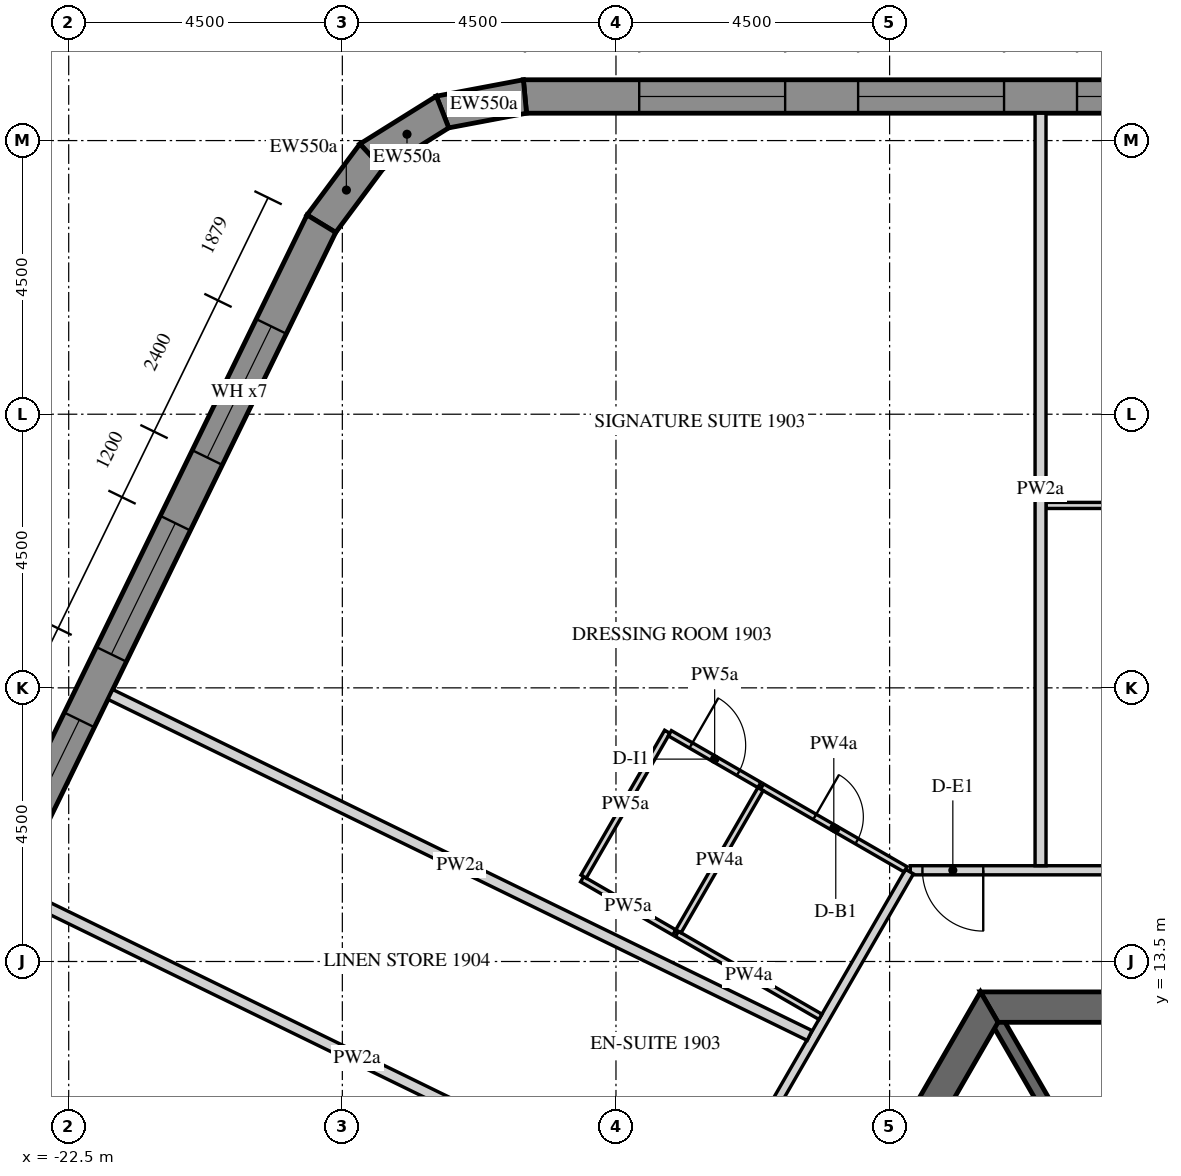
"""IFC4 building model, lengths in metres.
Left out: names, types, materials, properties, quantities, classifications, styles, units other than length and angle.
Written with IfcOpenShell. Run it as: python <this file> out.ifc"""

import sys

from ifc_helpers import new_model, si_unit, direction, frame, frame_2d, origin, place, context, subcontext, project, spatial, polyline, rectangle, outline, extrude, element, fill, save


model = new_model("IFC4")
c1 = context("Model", 3, precision=1e-05, world=origin(), true_north=direction((0.0, 1.0)))
c2 = subcontext(c1, "Body", "Model", "MODEL_VIEW")
j1 = project(units=[si_unit("LENGTHUNIT", "METRE"), si_unit("PLANEANGLEUNIT", "RADIAN")], contexts=[c1])
p1 = place(None, origin())
s1 = spatial("IfcSite", under=j1, at=p1, CompositionType="ELEMENT")
p2 = place(p1, origin())
s2 = spatial("IfcBuilding", under=s1, at=p2, CompositionType="ELEMENT")
p3 = place(p2, frame((0.0, 0.0, 246.3)))
s3 = spatial("IfcBuildingStorey", under=s2, at=p3, CompositionType="ELEMENT", Elevation=246.3)
p4 = place(p3, frame((12.761, 27.725, -0.15), z_axis=(0.0, 0.0, 1.0), x_axis=(-1.0, 0.0, 0.0)))
e1 = element("IfcWall", 1, at=p4, inside=s3, PredefinedType="SOLIDWALL", context=c2, shape_type="SweptSolid", body=[
    extrude(outline(polyline([(-0.022, -0.275), (27.783, -0.275), (27.732, 0.275), (0.022, 0.275), (-0.022, -0.275)])), origin(), (0.0, 0.0, 1.0), 3.75),
])
p5 = place(p4, frame((1.879, 0.0, 1.05)))
e2 = element("IfcOpeningElement", 2, at=p5, cuts=e1, PredefinedType="OPENING", context=c2, shape_type="SweptSolid", body=[
    extrude(rectangle(XDim=2.4, YDim=2.4, at=frame_2d((1.2, 1.2))), frame((0.0, 0.285, 0.0), z_axis=(0.0, -1.0, 0.0), x_axis=(1.0, 0.0, 0.0)), (0.0, 0.0, 1.0), 0.57),
])
p6 = place(p4, frame((5.479, 0.0, 1.05)))
e3 = element("IfcOpeningElement", 3, at=p6, cuts=e1, PredefinedType="OPENING", context=c2, shape_type="SweptSolid", body=[
    extrude(rectangle(XDim=2.4, YDim=2.4, at=frame_2d((1.2, 1.2))), frame((0.0, 0.285, 0.0), z_axis=(0.0, -1.0, 0.0), x_axis=(1.0, 0.0, 0.0)), (0.0, 0.0, 1.0), 0.57),
])
p7 = place(p4, frame((9.079, 0.0, 1.05)))
e4 = element("IfcOpeningElement", 4, at=p7, cuts=e1, PredefinedType="OPENING", context=c2, shape_type="SweptSolid", body=[
    extrude(rectangle(XDim=2.4, YDim=2.4, at=frame_2d((1.2, 1.2))), frame((0.0, 0.285, 0.0), z_axis=(0.0, -1.0, 0.0), x_axis=(1.0, 0.0, 0.0)), (0.0, 0.0, 1.0), 0.57),
])
p8 = place(p4, frame((12.679, 0.0, 1.05)))
e5 = element("IfcOpeningElement", 5, at=p8, cuts=e1, PredefinedType="OPENING", context=c2, shape_type="SweptSolid", body=[
    extrude(rectangle(XDim=2.4, YDim=2.4, at=frame_2d((1.2, 1.2))), frame((0.0, 0.285, 0.0), z_axis=(0.0, -1.0, 0.0), x_axis=(1.0, 0.0, 0.0)), (0.0, 0.0, 1.0), 0.57),
])
p9 = place(p4, frame((16.279, 0.0, 1.05)))
e6 = element("IfcOpeningElement", 6, at=p9, cuts=e1, PredefinedType="OPENING", context=c2, shape_type="SweptSolid", body=[
    extrude(rectangle(XDim=2.4, YDim=2.4, at=frame_2d((1.2, 1.2))), frame((0.0, 0.285, 0.0), z_axis=(0.0, -1.0, 0.0), x_axis=(1.0, 0.0, 0.0)), (0.0, 0.0, 1.0), 0.57),
])
p10 = place(p4, frame((19.879, 0.0, 1.05)))
e7 = element("IfcOpeningElement", 7, at=p10, cuts=e1, PredefinedType="OPENING", context=c2, shape_type="SweptSolid", body=[
    extrude(rectangle(XDim=2.4, YDim=2.4, at=frame_2d((1.2, 1.2))), frame((0.0, 0.285, 0.0), z_axis=(0.0, -1.0, 0.0), x_axis=(1.0, 0.0, 0.0)), (0.0, 0.0, 1.0), 0.57),
])
p11 = place(p4, frame((23.479, 0.0, 1.05)))
e8 = element("IfcOpeningElement", 8, at=p11, cuts=e1, PredefinedType="OPENING", context=c2, shape_type="SweptSolid", body=[
    extrude(rectangle(XDim=2.4, YDim=2.4, at=frame_2d((1.2, 1.2))), frame((0.0, 0.285, 0.0), z_axis=(0.0, -1.0, 0.0), x_axis=(1.0, 0.0, 0.0)), (0.0, 0.0, 1.0), 0.57),
])
p12 = place(p3, frame((-14.997, 27.725, -0.15), z_axis=(0.0, 0.0, 1.0), x_axis=(-0.982705443133, -0.185175624845, 0.0)))
e9 = element("IfcWall", 9, at=p12, inside=s3, PredefinedType="SOLIDWALL", context=c2, shape_type="SweptSolid", body=[
    extrude(outline(polyline([(-0.026, -0.275), (1.431, -0.275), (1.327, 0.275), (0.026, 0.275), (-0.026, -0.275)])), origin(), (0.0, 0.0, 1.0), 3.75),
])
p13 = place(p3, frame((-16.352, 27.47, -0.15), z_axis=(0.0, 0.0, 1.0), x_axis=(-0.848057977594, -0.5299034503, 0.0)))
e10 = element("IfcWall", 10, at=p13, inside=s3, PredefinedType="SOLIDWALL", context=c2, shape_type="SweptSolid", body=[
    extrude(outline(polyline([(-0.052, -0.275), (1.431, -0.275), (1.327, 0.275), (0.052, 0.275), (-0.052, -0.275)])), origin(), (0.0, 0.0, 1.0), 3.75),
])
p14 = place(p3, frame((-17.521, 26.739, -0.15), z_axis=(0.0, 0.0, 1.0), x_axis=(-0.597135295884, -0.802140535324, 0.0)))
e11 = element("IfcWall", 11, at=p14, inside=s3, PredefinedType="SOLIDWALL", context=c2, shape_type="SweptSolid", body=[
    extrude(outline(polyline([(-0.052, -0.275), (1.405, -0.275), (1.354, 0.275), (0.052, 0.275), (-0.052, -0.275)])), origin(), (0.0, 0.0, 1.0), 3.75),
])
p15 = place(p3, frame((-18.345, 25.633, -0.15), z_axis=(0.0, 0.0, 1.0), x_axis=(-0.43837181828, -0.898793718791, 0.0)))
e12 = element("IfcWall", 12, at=p15, inside=s3, PredefinedType="SOLIDWALL", context=c2, shape_type="SweptSolid", body=[
    extrude(outline(polyline([(-0.026, -0.275), (27.78, -0.275), (27.735, 0.275), (0.026, 0.275), (-0.026, -0.275)])), origin(), (0.0, 0.0, 1.0), 3.75),
])
p16 = place(p15, frame((1.879, 0.0, 1.05)))
e13 = element("IfcOpeningElement", 13, at=p16, cuts=e12, PredefinedType="OPENING", context=c2, shape_type="SweptSolid", body=[
    extrude(rectangle(XDim=2.4, YDim=2.4, at=frame_2d((1.2, 1.2))), frame((0.0, 0.285, 0.0), z_axis=(0.0, -1.0, 0.0), x_axis=(1.0, 0.0, 0.0)), (0.0, 0.0, 1.0), 0.57),
])
p17 = place(p15, frame((5.479, 0.0, 1.05)))
e14 = element("IfcOpeningElement", 14, at=p17, cuts=e12, PredefinedType="OPENING", context=c2, shape_type="SweptSolid", body=[
    extrude(rectangle(XDim=2.4, YDim=2.4, at=frame_2d((1.2, 1.2))), frame((0.0, 0.285, 0.0), z_axis=(0.0, -1.0, 0.0), x_axis=(1.0, 0.0, 0.0)), (0.0, 0.0, 1.0), 0.57),
])
p18 = place(p15, frame((9.079, 0.0, 1.05)))
e15 = element("IfcOpeningElement", 15, at=p18, cuts=e12, PredefinedType="OPENING", context=c2, shape_type="SweptSolid", body=[
    extrude(rectangle(XDim=2.4, YDim=2.4, at=frame_2d((1.2, 1.2))), frame((0.0, 0.285, 0.0), z_axis=(0.0, -1.0, 0.0), x_axis=(1.0, 0.0, 0.0)), (0.0, 0.0, 1.0), 0.57),
])
p19 = place(p15, frame((12.679, 0.0, 1.05)))
e16 = element("IfcOpeningElement", 16, at=p19, cuts=e12, PredefinedType="OPENING", context=c2, shape_type="SweptSolid", body=[
    extrude(rectangle(XDim=2.4, YDim=2.4, at=frame_2d((1.2, 1.2))), frame((0.0, 0.285, 0.0), z_axis=(0.0, -1.0, 0.0), x_axis=(1.0, 0.0, 0.0)), (0.0, 0.0, 1.0), 0.57),
])
p20 = place(p15, frame((16.279, 0.0, 1.05)))
e17 = element("IfcOpeningElement", 17, at=p20, cuts=e12, PredefinedType="OPENING", context=c2, shape_type="SweptSolid", body=[
    extrude(rectangle(XDim=2.4, YDim=2.4, at=frame_2d((1.2, 1.2))), frame((0.0, 0.285, 0.0), z_axis=(0.0, -1.0, 0.0), x_axis=(1.0, 0.0, 0.0)), (0.0, 0.0, 1.0), 0.57),
])
p21 = place(p15, frame((19.879, 0.0, 1.05)))
e18 = element("IfcOpeningElement", 18, at=p21, cuts=e12, PredefinedType="OPENING", context=c2, shape_type="SweptSolid", body=[
    extrude(rectangle(XDim=2.4, YDim=2.4, at=frame_2d((1.2, 1.2))), frame((0.0, 0.285, 0.0), z_axis=(0.0, -1.0, 0.0), x_axis=(1.0, 0.0, 0.0)), (0.0, 0.0, 1.0), 0.57),
])
p22 = place(p15, frame((23.479, 0.0, 1.05)))
e19 = element("IfcOpeningElement", 19, at=p22, cuts=e12, PredefinedType="OPENING", context=c2, shape_type="SweptSolid", body=[
    extrude(rectangle(XDim=2.4, YDim=2.4, at=frame_2d((1.2, 1.2))), frame((0.0, 0.285, 0.0), z_axis=(0.0, -1.0, 0.0), x_axis=(1.0, 0.0, 0.0)), (0.0, 0.0, 1.0), 0.57),
])
p23 = place(p3, frame((-7.361, 12.75, -0.15), z_axis=(0.0, 0.0, 1.0), x_axis=(-0.50000571537, -0.866022103989, 0.0)))
e20 = element("IfcWall", 20, at=p23, inside=s3, PredefinedType="SHEAR", context=c2, shape_type="SweptSolid", body=[
    extrude(outline(polyline([(-0.144, -0.25), (14.867, -0.25), (14.578, 0.25), (0.144, 0.25), (-0.144, -0.25)])), origin(), (0.0, 0.0, 1.0), 3.75),
])
p24 = place(p23, frame((6.49, 0.0, 0.15)))
e21 = element("IfcOpeningElement", 21, at=p24, cuts=e20, PredefinedType="OPENING", context=c2, shape_type="SweptSolid", body=[
    extrude(rectangle(XDim=1.8, YDim=2.4, at=frame_2d((0.9, 1.2))), frame((0.0, 0.26, 0.0), z_axis=(0.0, -1.0, 0.0), x_axis=(1.0, 0.0, 0.0)), (0.0, 0.0, 1.0), 0.52),
])
p25 = place(p3, frame((7.361, 12.75, -0.15), z_axis=(0.0, 0.0, 1.0), x_axis=(-1.0, 0.0, 0.0)))
e22 = element("IfcWall", 22, at=p25, inside=s3, PredefinedType="SHEAR", context=c2, shape_type="SweptSolid", body=[
    extrude(outline(polyline([(-0.144, -0.25), (14.866, -0.25), (14.578, 0.25), (0.144, 0.25), (-0.144, -0.25)])), origin(), (0.0, 0.0, 1.0), 3.75),
])
p26 = place(p25, frame((6.761, 0.0, 0.15)))
e23 = element("IfcOpeningElement", 23, at=p26, cuts=e22, PredefinedType="OPENING", context=c2, shape_type="SweptSolid", body=[
    extrude(rectangle(XDim=1.2, YDim=2.4, at=frame_2d((0.6, 1.2))), frame((0.0, 0.26, 0.0), z_axis=(0.0, -1.0, 0.0), x_axis=(1.0, 0.0, 0.0)), (0.0, 0.0, 1.0), 0.52),
])
p27 = place(p3, frame((-5.773, 10.0, -0.15), z_axis=(0.0, 0.0, 1.0), x_axis=(-0.499995765644, 0.866027848477, 0.0)))
e24 = element("IfcWall", 24, at=p27, inside=s3, PredefinedType="SHEAR", context=c2, shape_type="SweptSolid", body=[
    extrude(rectangle(XDim=2.887, YDim=0.2, at=frame_2d((1.443, 0.0))), origin(), (0.0, 0.0, 1.0), 3.75),
])
p28 = place(p3, frame((4.207, 15.0, 0.0), z_axis=(0.0, 0.0, 1.0), x_axis=(-1.0, 0.0, 0.0)))
e25 = element("IfcWall", 25, at=p28, inside=s3, PredefinedType="PARTITIONING", context=c2, shape_type="SweptSolid", body=[
    extrude(rectangle(XDim=12.867, YDim=0.15, at=frame_2d((6.434, 0.0))), origin(), (0.0, 0.0, 1.0), 2.838),
])
p29 = place(p28, frame((6.025, 0.0, 0.0)))
e26 = element("IfcOpeningElement", 26, at=p29, cuts=e25, PredefinedType="OPENING", context=c2, shape_type="SweptSolid", body=[
    extrude(rectangle(XDim=1.0, YDim=2.1, at=frame_2d((0.5, 1.05))), frame((0.0, 0.085, 0.0), z_axis=(0.0, -1.0, 0.0), x_axis=(1.0, 0.0, 0.0)), (0.0, 0.0, 1.0), 0.17),
])
p30 = place(p28, frame((11.667, 0.0, 0.0)))
e27 = element("IfcOpeningElement", 27, at=p30, cuts=e25, PredefinedType="OPENING", context=c2, shape_type="SweptSolid", body=[
    extrude(rectangle(XDim=1.0, YDim=2.1, at=frame_2d((0.5, 1.05))), frame((0.0, 0.085, 0.0), z_axis=(0.0, -1.0, 0.0), x_axis=(1.0, 0.0, 0.0)), (0.0, 0.0, 1.0), 0.17),
])
p31 = place(p3, frame((-8.673, 14.978, 0.0), z_axis=(0.0, 0.0, 1.0), x_axis=(-0.50000700621, -0.86602135871, 0.0)))
e28 = element("IfcWall", 28, at=p31, inside=s3, PredefinedType="PARTITIONING", context=c2, shape_type="SweptSolid", body=[
    extrude(rectangle(XDim=14.928, YDim=0.15, at=frame_2d((7.464, 0.0))), origin(), (0.0, 0.0, 1.0), 2.838),
])
p32 = place(p31, frame((4.454, 0.0, 0.0)))
e29 = element("IfcOpeningElement", 29, at=p32, cuts=e28, PredefinedType="OPENING", context=c2, shape_type="SweptSolid", body=[
    extrude(rectangle(XDim=1.0, YDim=2.1, at=frame_2d((0.5, 1.05))), frame((0.0, 0.085, 0.0), z_axis=(0.0, -1.0, 0.0), x_axis=(1.0, 0.0, 0.0)), (0.0, 0.0, 1.0), 0.17),
])
p33 = place(p31, frame((11.264, 0.0, 0.0)))
e30 = element("IfcOpeningElement", 30, at=p33, cuts=e28, PredefinedType="OPENING", context=c2, shape_type="SweptSolid", body=[
    extrude(rectangle(XDim=1.0, YDim=2.1, at=frame_2d((0.5, 1.05))), frame((0.0, 0.085, 0.0), z_axis=(0.0, -1.0, 0.0), x_axis=(1.0, 0.0, 0.0)), (0.0, 0.0, 1.0), 0.17),
])
p34 = place(p3, frame((0.632, 21.0, 0.0), z_axis=(0.0, 0.0, 1.0), x_axis=(-1.0, 0.0, 0.0)))
e31 = element("IfcWall", 31, at=p34, inside=s3, PredefinedType="PARTITIONING", context=c2, shape_type="SweptSolid", body=[
    extrude(rectangle(XDim=7.06, YDim=0.1, at=frame_2d((3.53, 0.0))), origin(), (0.0, 0.0, 1.0), 2.838),
])
p35 = place(p34, frame((3.1, 0.0, 0.0)))
e32 = element("IfcOpeningElement", 32, at=p35, cuts=e31, PredefinedType="OPENING", context=c2, shape_type="SweptSolid", body=[
    extrude(rectangle(XDim=0.9, YDim=2.1, at=frame_2d((0.45, 1.05))), frame((0.0, 0.06, 0.0), z_axis=(0.0, -1.0, 0.0), x_axis=(1.0, 0.0, 0.0)), (0.0, 0.0, 1.0), 0.12),
])
p36 = place(p3, frame((-6.518, 27.45, 0.0), z_axis=(0.0, 0.0, 1.0), x_axis=(0.0, -1.0, 0.0)))
e33 = element("IfcWall", 33, at=p36, inside=s3, PredefinedType="PARTITIONING", context=c2, shape_type="SweptSolid", body=[
    extrude(rectangle(XDim=12.375, YDim=0.18, at=frame_2d((6.188, 0.0))), origin(), (0.0, 0.0, 1.0), 2.838),
])
p37 = place(p3, frame((-10.138, 12.591, 0.0), z_axis=(0.0, 0.0, 1.0), x_axis=(-0.866051307416, 0.49995513091, 0.0)))
e34 = element("IfcWall", 34, at=p37, inside=s3, PredefinedType="PARTITIONING", context=c2, shape_type="SweptSolid", body=[
    extrude(rectangle(XDim=2.725, YDim=0.1, at=frame_2d((1.362, 0.0))), origin(), (0.0, 0.0, 1.0), 2.838),
])
p38 = place(p3, frame((-11.098, 16.378, 0.0), z_axis=(0.0, 0.0, 1.0), x_axis=(0.866012511928, -0.500022328685, 0.0)))
e35 = element("IfcWall", 35, at=p38, inside=s3, PredefinedType="PARTITIONING", context=c2, shape_type="SweptSolid", body=[
    extrude(rectangle(XDim=2.725, YDim=0.1, at=frame_2d((1.363, 0.0))), origin(), (0.0, 0.0, 1.0), 2.838),
])
p39 = place(p38, frame((1.0, 0.0, 0.0)))
e36 = element("IfcOpeningElement", 36, at=p39, cuts=e35, PredefinedType="OPENING", context=c2, shape_type="SweptSolid", body=[
    extrude(rectangle(XDim=0.8, YDim=2.1, at=frame_2d((0.4, 1.05))), frame((0.0, 0.06, 0.0), z_axis=(0.0, -1.0, 0.0), x_axis=(1.0, 0.0, 0.0)), (0.0, 0.0, 1.0), 0.12),
])
p40 = place(p3, frame((-12.541, 13.978, 0.0), z_axis=(0.0, 0.0, 1.0), x_axis=(-0.866036909293, 0.499980071345, 0.0)))
e37 = element("IfcWall", 37, at=p40, inside=s3, PredefinedType="PARTITIONING", context=c2, shape_type="SweptSolid", body=[
    extrude(rectangle(XDim=1.75, YDim=0.1, at=frame_2d((0.875, 0.0))), origin(), (0.0, 0.0, 1.0), 2.838),
])
p41 = place(p3, frame((-14.031, 14.896, 0.0), z_axis=(0.0, 0.0, 1.0), x_axis=(0.499996545922, 0.866027397988, 0.0)))
e38 = element("IfcWall", 38, at=p41, inside=s3, PredefinedType="PARTITIONING", context=c2, shape_type="SweptSolid", body=[
    extrude(rectangle(XDim=2.75, YDim=0.1, at=frame_2d((1.375, 0.0))), origin(), (0.0, 0.0, 1.0), 2.838),
])
p42 = place(p3, frame((-12.613, 17.253, 0.0), z_axis=(0.0, 0.0, 1.0), x_axis=(0.865989465428, -0.500062241894, 0.0)))
e39 = element("IfcWall", 39, at=p42, inside=s3, PredefinedType="PARTITIONING", context=c2, shape_type="SweptSolid", body=[
    extrude(rectangle(XDim=1.7, YDim=0.1, at=frame_2d((0.85, 0.0))), origin(), (0.0, 0.0, 1.0), 2.838),
])
p43 = place(p42, frame((0.4, 0.0, 0.0)))
e40 = element("IfcOpeningElement", 40, at=p43, cuts=e39, PredefinedType="OPENING", context=c2, shape_type="SweptSolid", body=[
    extrude(rectangle(XDim=0.9, YDim=2.1, at=frame_2d((0.45, 1.05))), frame((0.0, 0.06, 0.0), z_axis=(0.0, -1.0, 0.0), x_axis=(1.0, 0.0, 0.0)), (0.0, 0.0, 1.0), 0.12),
])
p44 = place(p3, frame((-21.815, 17.892, 0.0), z_axis=(0.0, 0.0, 1.0), x_axis=(0.898799253997, -0.438360469265, 0.0)))
e41 = element("IfcWall", 41, at=p44, inside=s3, PredefinedType="PARTITIONING", context=c2, shape_type="SweptSolid", body=[
    extrude(rectangle(XDim=12.794, YDim=0.18, at=frame_2d((6.397, 0.0))), origin(), (0.0, 0.0, 1.0), 2.838),
])
p45 = place(p3, frame((-11.123, 16.335, 0.0), z_axis=(0.0, 0.0, 1.0), x_axis=(-0.499980770555, -0.866036505625, 0.0)))
e42 = element("IfcWall", 42, at=p45, inside=s3, PredefinedType="PARTITIONING", context=c2, shape_type="SweptSolid", body=[
    extrude(rectangle(XDim=2.7, YDim=0.1, at=frame_2d((1.35, 0.0))), origin(), (0.0, 0.0, 1.0), 2.838),
])
p46 = place(p3, frame((-23.393, 14.656, 0.0), z_axis=(0.0, 0.0, 1.0), x_axis=(0.898790706576, -0.43837799417, 0.0)))
e43 = element("IfcWall", 43, at=p46, inside=s3, PredefinedType="PARTITIONING", context=c2, shape_type="SweptSolid", body=[
    extrude(rectangle(XDim=12.542, YDim=0.18, at=frame_2d((6.271, 0.0))), origin(), (0.0, 0.0, 1.0), 2.838),
])
p47 = place(p9, frame((0.0, 0.205, 0.0)))
e44 = element("IfcWindow", 44, at=p47, inside=s3, PartitioningType="DOUBLE_PANEL_VERTICAL", PredefinedType="WINDOW", context=c2, shape_type="SweptSolid", body=[
    extrude(rectangle(XDim=2.4, YDim=2.4, at=frame_2d((1.2, 1.2))), frame((0.0, 0.03, 0.0), z_axis=(0.0, -1.0, 0.0), x_axis=(1.0, 0.0, 0.0)), (0.0, 0.0, 1.0), 0.06),
])
fill(e6, e44)
p48 = place(p10, frame((0.0, 0.205, 0.0)))
e45 = element("IfcWindow", 45, at=p48, inside=s3, PartitioningType="DOUBLE_PANEL_VERTICAL", PredefinedType="WINDOW", context=c2, shape_type="SweptSolid", body=[
    extrude(rectangle(XDim=2.4, YDim=2.4, at=frame_2d((1.2, 1.2))), frame((0.0, 0.03, 0.0), z_axis=(0.0, -1.0, 0.0), x_axis=(1.0, 0.0, 0.0)), (0.0, 0.0, 1.0), 0.06),
])
fill(e7, e45)
p49 = place(p11, frame((0.0, 0.205, 0.0)))
e46 = element("IfcWindow", 46, at=p49, inside=s3, PartitioningType="DOUBLE_PANEL_VERTICAL", PredefinedType="WINDOW", context=c2, shape_type="SweptSolid", body=[
    extrude(rectangle(XDim=2.4, YDim=2.4, at=frame_2d((1.2, 1.2))), frame((0.0, 0.03, 0.0), z_axis=(0.0, -1.0, 0.0), x_axis=(1.0, 0.0, 0.0)), (0.0, 0.0, 1.0), 0.06),
])
fill(e8, e46)
p50 = place(p16, frame((0.0, 0.205, 0.0)))
e47 = element("IfcWindow", 47, at=p50, inside=s3, PartitioningType="DOUBLE_PANEL_VERTICAL", PredefinedType="WINDOW", context=c2, shape_type="SweptSolid", body=[
    extrude(rectangle(XDim=2.4, YDim=2.4, at=frame_2d((1.2, 1.2))), frame((0.0, 0.03, 0.0), z_axis=(0.0, -1.0, 0.0), x_axis=(1.0, 0.0, 0.0)), (0.0, 0.0, 1.0), 0.06),
])
fill(e13, e47)
p51 = place(p17, frame((0.0, 0.205, 0.0)))
e48 = element("IfcWindow", 48, at=p51, inside=s3, PartitioningType="DOUBLE_PANEL_VERTICAL", PredefinedType="WINDOW", context=c2, shape_type="SweptSolid", body=[
    extrude(rectangle(XDim=2.4, YDim=2.4, at=frame_2d((1.2, 1.2))), frame((0.0, 0.03, 0.0), z_axis=(0.0, -1.0, 0.0), x_axis=(1.0, 0.0, 0.0)), (0.0, 0.0, 1.0), 0.06),
])
fill(e14, e48)
p52 = place(p18, frame((0.0, 0.205, 0.0)))
e49 = element("IfcWindow", 49, at=p52, inside=s3, PartitioningType="DOUBLE_PANEL_VERTICAL", PredefinedType="WINDOW", context=c2, shape_type="SweptSolid", body=[
    extrude(rectangle(XDim=2.4, YDim=2.4, at=frame_2d((1.2, 1.2))), frame((0.0, 0.03, 0.0), z_axis=(0.0, -1.0, 0.0), x_axis=(1.0, 0.0, 0.0)), (0.0, 0.0, 1.0), 0.06),
])
fill(e15, e49)
p53 = place(p30, origin())
e50 = element("IfcDoor", 50, at=p53, inside=s3, OperationType="SINGLE_SWING_LEFT", PredefinedType="DOOR", context=c2, shape_type="SweptSolid", body=[
    extrude(rectangle(XDim=1.0, YDim=2.1, at=frame_2d((0.5, 1.05))), frame((0.0, 0.025, 0.0), z_axis=(0.0, -1.0, 0.0), x_axis=(1.0, 0.0, 0.0)), (0.0, 0.0, 1.0), 0.05),
])
fill(e27, e50)
p54 = place(p39, origin())
e51 = element("IfcDoor", 51, at=p54, inside=s3, OperationType="SINGLE_SWING_LEFT", PredefinedType="DOOR", context=c2, shape_type="SweptSolid", body=[
    extrude(rectangle(XDim=0.8, YDim=2.1, at=frame_2d((0.4, 1.05))), frame((0.0, 0.025, 0.0), z_axis=(0.0, -1.0, 0.0), x_axis=(1.0, 0.0, 0.0)), (0.0, 0.0, 1.0), 0.05),
])
fill(e36, e51)
p55 = place(p43, origin())
e52 = element("IfcDoor", 52, at=p55, inside=s3, OperationType="SINGLE_SWING_LEFT", PredefinedType="DOOR", context=c2, shape_type="SweptSolid", body=[
    extrude(rectangle(XDim=0.9, YDim=2.1, at=frame_2d((0.45, 1.05))), frame((0.0, 0.025, 0.0), z_axis=(0.0, -1.0, 0.0), x_axis=(1.0, 0.0, 0.0)), (0.0, 0.0, 1.0), 0.05),
])
fill(e40, e52)
save(model, sys.argv[1])
